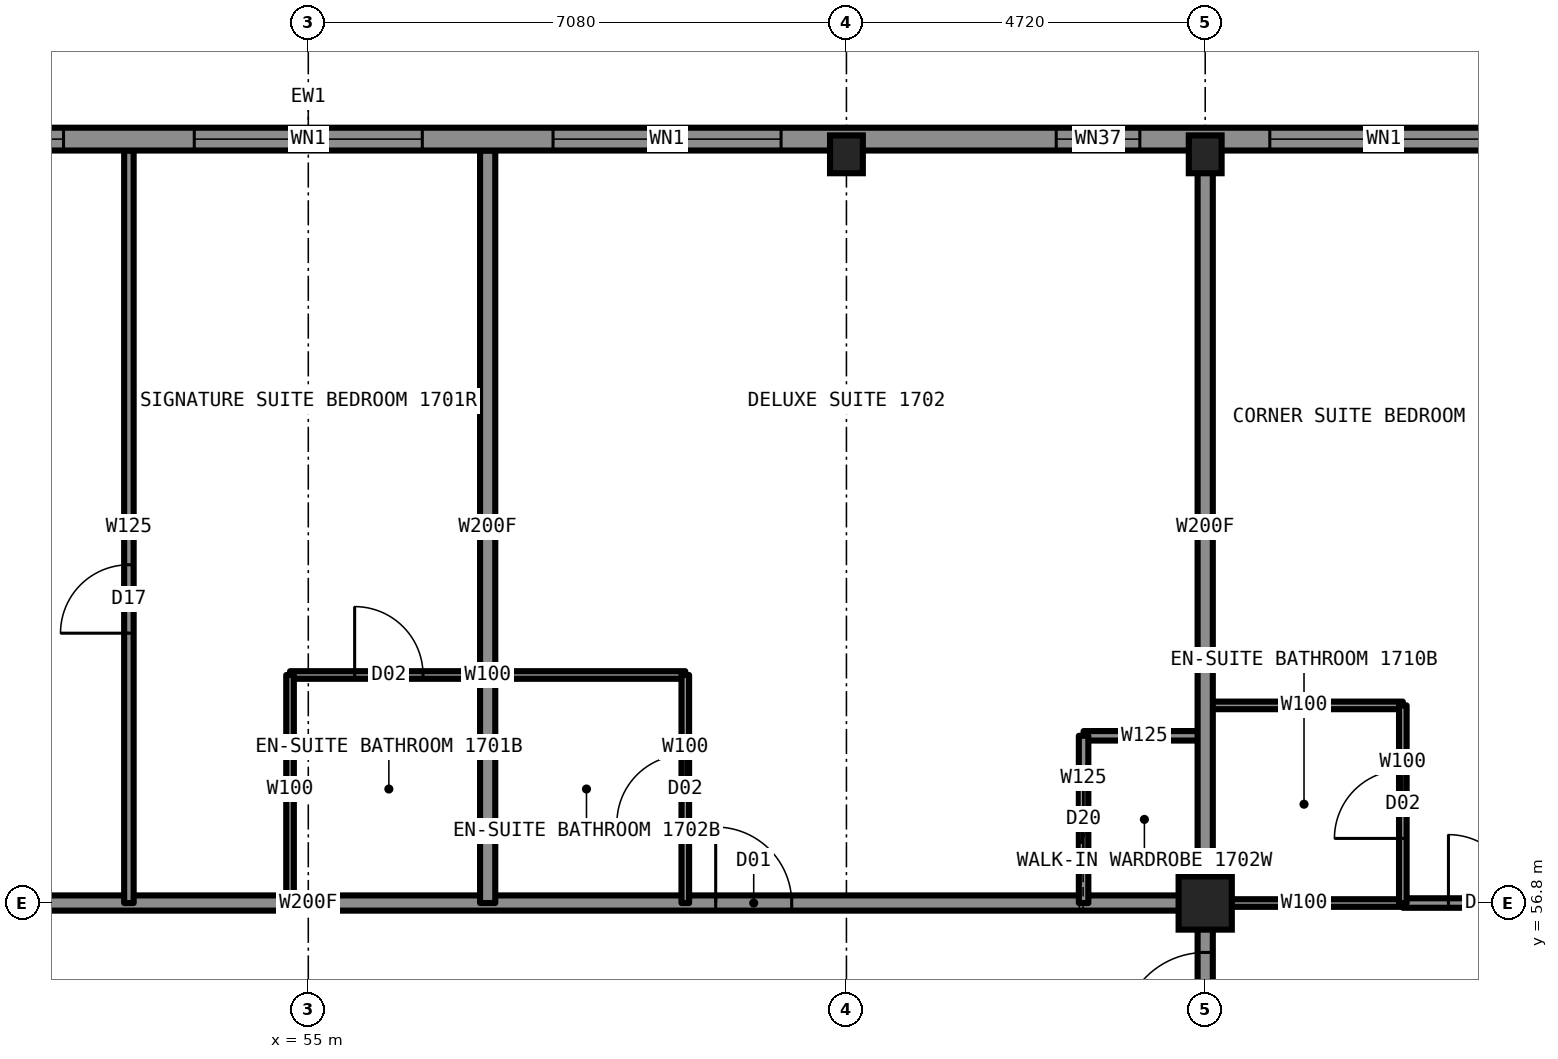
"""IFC4 building model, lengths in metres.
Left out: names, types, materials, properties, quantities, classifications, styles, units other than length and angle.
Written with IfcOpenShell. Run it as: python <this file> out.ifc"""

import sys

from ifc_helpers import new_model, si_unit, direction, frame, frame_2d, origin, origin_2d, place, context, subcontext, project, spatial, rectangle, hollow_rectangle, i_section, extrude, element, fill, save


model = new_model("IFC4")
c1 = context("Model", 3, precision=1e-05, world=origin(), true_north=direction((0.0, 1.0)))
c2 = subcontext(c1, "Body", "Model", "MODEL_VIEW")
j1 = project(units=[si_unit("LENGTHUNIT", "METRE"), si_unit("PLANEANGLEUNIT", "RADIAN")], contexts=[c1])
p1 = place(None, origin())
s1 = spatial("IfcSite", under=j1, at=p1, CompositionType="ELEMENT")
p2 = place(p1, origin())
s2 = spatial("IfcBuilding", under=s1, at=p2, CompositionType="ELEMENT")
p3 = place(p2, frame((0.0, 0.0, 60.0)))
s3 = spatial("IfcBuildingStorey", under=s2, at=p3, CompositionType="ELEMENT", Elevation=60.0)
for number, where, z_axis, x_axis in (
    (1, (62.08, 66.65, 0.0), (0.0, 0.0, 1.0), (1.0, 0.0, 0.0)),
    (2, (66.8, 66.65, 0.0), (0.0, 0.0, 1.0), (1.0, 0.0, 0.0)),
):
    element("IfcColumn", number, at=place(p3, frame(where, z_axis=z_axis, x_axis=x_axis)), inside=s3, PredefinedType="COLUMN", context=c2, shape_type="SweptSolid", body=[
        extrude(i_section(OverallWidth=0.432, OverallDepth=0.498, WebThickness=0.056, FlangeThickness=0.089, at=origin_2d()), origin(), (0.0, 0.0, 1.0), 3.5),
    ])
p4 = place(p3, frame((66.8, 56.8, 0.0), z_axis=(0.0, 0.0, 1.0), x_axis=(1.0, 0.0, 0.0)))
e3 = element("IfcColumn", 3, at=p4, inside=s3, PredefinedType="COLUMN", context=c2, shape_type="SweptSolid", body=[
    extrude(hollow_rectangle(XDim=0.7, YDim=0.7, WallThickness=0.06, at=origin_2d()), origin(), (0.0, 0.0, 1.0), 3.5),
])
p5 = place(p3, frame((66.8, 56.8, 0.0), z_axis=(0.0, 0.0, 1.0), x_axis=(1.0, 0.0, 0.0)))
e4 = element("IfcWall", 4, at=p5, inside=s3, PredefinedType="PARTITIONING", context=c2, shape_type="SweptSolid", body=[
    extrude(rectangle(XDim=2.6, YDim=0.1, at=frame_2d((1.3, 0.0))), origin(), (0.0, 0.0, 1.0), 2.573),
])
p6 = place(p3, frame((43.2, 56.8, 0.0), z_axis=(0.0, 0.0, 1.0), x_axis=(1.0, 0.0, 0.0)))
e5 = element("IfcWall", 5, at=p6, inside=s3, PredefinedType="PARTITIONING", context=c2, shape_type="SweptSolid", body=[
    extrude(rectangle(XDim=23.6, YDim=0.2, at=frame_2d((11.8, 0.0))), origin(), (0.0, 0.0, 1.0), 3.33),
])
p7 = place(p6, frame((1.85, 0.0, 0.0)))
e6 = element("IfcOpeningElement", 6, at=p7, cuts=e5, PredefinedType="OPENING", context=c2, shape_type="SweptSolid", body=[
    extrude(rectangle(XDim=1.1, YDim=2.2, at=frame_2d((0.55, 1.1))), frame((0.0, 0.11, 0.0), z_axis=(0.0, -1.0, 0.0), x_axis=(1.0, 0.0, 0.0)), (0.0, 0.0, 1.0), 0.22),
])
p8 = place(p6, frame((17.16, 0.0, 0.0)))
e7 = element("IfcOpeningElement", 7, at=p8, cuts=e5, PredefinedType="OPENING", context=c2, shape_type="SweptSolid", body=[
    extrude(rectangle(XDim=1.0, YDim=2.2, at=frame_2d((0.5, 1.1))), frame((0.0, 0.11, 0.0), z_axis=(0.0, -1.0, 0.0), x_axis=(1.0, 0.0, 0.0)), (0.0, 0.0, 1.0), 0.22),
])
p9 = place(p3, frame((69.4, 56.8, 0.0), z_axis=(0.0, 0.0, 1.0), x_axis=(1.0, 0.0, 0.0)))
e8 = element("IfcWall", 8, at=p9, inside=s3, PredefinedType="PARTITIONING", context=c2, shape_type="SweptSolid", body=[
    extrude(rectangle(XDim=7.3, YDim=0.125, at=frame_2d((3.65, 0.0))), origin(), (0.0, 0.0, 1.0), 2.573),
])
p10 = place(p9, frame((0.6, 0.0, 0.0)))
e9 = element("IfcOpeningElement", 9, at=p10, cuts=e8, PredefinedType="OPENING", context=c2, shape_type="SweptSolid", body=[
    extrude(rectangle(XDim=0.9, YDim=2.2, at=frame_2d((0.45, 1.1))), frame((0.0, 0.073, 0.0), z_axis=(0.0, -1.0, 0.0), x_axis=(1.0, 0.0, 0.0)), (0.0, 0.0, 1.0), 0.145),
])
p11 = place(p9, frame((4.4, 0.0, 0.0)))
e10 = element("IfcOpeningElement", 10, at=p11, cuts=e8, PredefinedType="OPENING", context=c2, shape_type="SweptSolid", body=[
    extrude(rectangle(XDim=0.9, YDim=2.2, at=frame_2d((0.45, 1.1))), frame((0.0, 0.073, 0.0), z_axis=(0.0, -1.0, 0.0), x_axis=(1.0, 0.0, 0.0)), (0.0, 0.0, 1.0), 0.145),
])
p12 = place(p3, frame((65.2, 59.0, 0.0), z_axis=(0.0, 0.0, 1.0), x_axis=(1.0, 0.0, 0.0)))
e11 = element("IfcWall", 11, at=p12, inside=s3, PredefinedType="PARTITIONING", context=c2, shape_type="SweptSolid", body=[
    extrude(rectangle(XDim=1.6, YDim=0.125, at=frame_2d((0.8, 0.0))), origin(), (0.0, 0.0, 1.0), 3.33),
])
p13 = place(p3, frame((66.8, 59.4, 0.0), z_axis=(0.0, 0.0, 1.0), x_axis=(1.0, 0.0, 0.0)))
e12 = element("IfcWall", 12, at=p13, inside=s3, PredefinedType="PARTITIONING", context=c2, shape_type="SweptSolid", body=[
    extrude(rectangle(XDim=2.6, YDim=0.1, at=frame_2d((1.3, 0.0))), origin(), (0.0, 0.0, 1.0), 3.33),
])
p14 = place(p3, frame((54.76, 59.8, 0.0), z_axis=(0.0, 0.0, 1.0), x_axis=(1.0, 0.0, 0.0)))
e13 = element("IfcWall", 13, at=p14, inside=s3, PredefinedType="PARTITIONING", context=c2, shape_type="SweptSolid", body=[
    extrude(rectangle(XDim=5.2, YDim=0.1, at=frame_2d((2.6, 0.0))), origin(), (0.0, 0.0, 1.0), 3.33),
])
p15 = place(p14, frame((0.85, 0.0, 0.0)))
e14 = element("IfcOpeningElement", 14, at=p15, cuts=e13, PredefinedType="OPENING", context=c2, shape_type="SweptSolid", body=[
    extrude(rectangle(XDim=0.9, YDim=2.1, at=frame_2d((0.45, 1.05))), frame((0.0, 0.06, 0.0), z_axis=(0.0, -1.0, 0.0), x_axis=(1.0, 0.0, 0.0)), (0.0, 0.0, 1.0), 0.12),
])
p16 = place(p3, frame((54.76, 56.8, 0.0), z_axis=(0.0, 0.0, 1.0), x_axis=(0.0, 1.0, 0.0)))
e15 = element("IfcWall", 15, at=p16, inside=s3, PredefinedType="PARTITIONING", context=c2, shape_type="SweptSolid", body=[
    extrude(rectangle(XDim=3.0, YDim=0.1, at=frame_2d((1.5, 0.0))), origin(), (0.0, 0.0, 1.0), 3.33),
])
p17 = place(p3, frame((52.64, 56.8, 0.0), z_axis=(0.0, 0.0, 1.0), x_axis=(0.0, 1.0, 0.0)))
e16 = element("IfcWall", 16, at=p17, inside=s3, PredefinedType="PARTITIONING", context=c2, shape_type="SweptSolid", body=[
    extrude(rectangle(XDim=9.9, YDim=0.125, at=frame_2d((4.95, 0.0))), origin(), (0.0, 0.0, 1.0), 3.33),
])
p18 = place(p17, frame((3.55, 0.0, 0.0)))
e17 = element("IfcOpeningElement", 17, at=p18, cuts=e16, PredefinedType="OPENING", context=c2, shape_type="SweptSolid", body=[
    extrude(rectangle(XDim=0.9, YDim=2.2, at=frame_2d((0.45, 1.1))), frame((0.0, 0.073, 0.0), z_axis=(0.0, -1.0, 0.0), x_axis=(1.0, 0.0, 0.0)), (0.0, 0.0, 1.0), 0.145),
])
p19 = place(p3, frame((65.2, 56.8, 0.0), z_axis=(0.0, 0.0, 1.0), x_axis=(0.0, 1.0, 0.0)))
e18 = element("IfcWall", 18, at=p19, inside=s3, PredefinedType="PARTITIONING", context=c2, shape_type="SweptSolid", body=[
    extrude(rectangle(XDim=2.2, YDim=0.125, at=frame_2d((1.1, 0.0))), origin(), (0.0, 0.0, 1.0), 3.33),
])
p20 = place(p19, frame((0.7, 0.0, 0.0)))
e19 = element("IfcOpeningElement", 19, at=p20, cuts=e18, PredefinedType="OPENING", context=c2, shape_type="SweptSolid", body=[
    extrude(rectangle(XDim=0.8, YDim=2.1, at=frame_2d((0.4, 1.05))), frame((0.0, 0.073, 0.0), z_axis=(0.0, -1.0, 0.0), x_axis=(1.0, 0.0, 0.0)), (0.0, 0.0, 1.0), 0.145),
])
p21 = place(p3, frame((66.8, 33.22, 0.0), z_axis=(0.0, 0.0, 1.0), x_axis=(0.0, 1.0, 0.0)))
e20 = element("IfcWall", 20, at=p21, inside=s3, PredefinedType="PARTITIONING", context=c2, shape_type="SweptSolid", body=[
    extrude(rectangle(XDim=23.58, YDim=0.2, at=frame_2d((11.79, 0.0))), origin(), (0.0, 0.0, 1.0), 3.33),
])
p22 = place(p21, frame((7.7, 0.0, 0.0)))
e21 = element("IfcOpeningElement", 21, at=p22, cuts=e20, PredefinedType="OPENING", context=c2, shape_type="SweptSolid", body=[
    extrude(rectangle(XDim=1.0, YDim=2.2, at=frame_2d((0.5, 1.1))), frame((0.0, 0.11, 0.0), z_axis=(0.0, -1.0, 0.0), x_axis=(1.0, 0.0, 0.0)), (0.0, 0.0, 1.0), 0.22),
])
p23 = place(p21, frame((17.29, 0.0, 0.0)))
e22 = element("IfcOpeningElement", 22, at=p23, cuts=e20, PredefinedType="OPENING", context=c2, shape_type="SweptSolid", body=[
    extrude(rectangle(XDim=1.0, YDim=2.2, at=frame_2d((0.5, 1.1))), frame((0.0, 0.11, 0.0), z_axis=(0.0, -1.0, 0.0), x_axis=(1.0, 0.0, 0.0)), (0.0, 0.0, 1.0), 0.22),
])
p24 = place(p21, frame((21.83, 0.0, 0.0)))
e23 = element("IfcOpeningElement", 23, at=p24, cuts=e20, PredefinedType="OPENING", context=c2, shape_type="SweptSolid", body=[
    extrude(rectangle(XDim=1.1, YDim=2.2, at=frame_2d((0.55, 1.1))), frame((0.0, 0.11, 0.0), z_axis=(0.0, -1.0, 0.0), x_axis=(1.0, 0.0, 0.0)), (0.0, 0.0, 1.0), 0.22),
])
p25 = place(p21, frame((0.63, 0.0, 0.0)))
e24 = element("IfcOpeningElement", 24, at=p25, cuts=e20, PredefinedType="OPENING", context=c2, shape_type="SweptSolid", body=[
    extrude(rectangle(XDim=1.1, YDim=2.2, at=frame_2d((0.55, 1.1))), frame((0.0, 0.11, 0.0), z_axis=(0.0, -1.0, 0.0), x_axis=(1.0, 0.0, 0.0)), (0.0, 0.0, 1.0), 0.22),
])
p26 = place(p3, frame((66.8, 56.8, 0.0), z_axis=(0.0, 0.0, 1.0), x_axis=(0.0, 1.0, 0.0)))
e25 = element("IfcWall", 25, at=p26, inside=s3, PredefinedType="PARTITIONING", context=c2, shape_type="SweptSolid", body=[
    extrude(rectangle(XDim=9.9, YDim=0.2, at=frame_2d((4.95, 0.0))), origin(), (0.0, 0.0, 1.0), 2.573),
])
p27 = place(p3, frame((69.4, 56.8, 0.0), z_axis=(0.0, 0.0, 1.0), x_axis=(0.0, 1.0, 0.0)))
e26 = element("IfcWall", 26, at=p27, inside=s3, PredefinedType="PARTITIONING", context=c2, shape_type="SweptSolid", body=[
    extrude(rectangle(XDim=2.6, YDim=0.1, at=frame_2d((1.3, 0.0))), origin(), (0.0, 0.0, 1.0), 3.33),
])
p28 = place(p27, frame((0.85, 0.0, 0.0)))
e27 = element("IfcOpeningElement", 27, at=p28, cuts=e26, PredefinedType="OPENING", context=c2, shape_type="SweptSolid", body=[
    extrude(rectangle(XDim=0.9, YDim=2.1, at=frame_2d((0.45, 1.05))), frame((0.0, 0.06, 0.0), z_axis=(0.0, -1.0, 0.0), x_axis=(1.0, 0.0, 0.0)), (0.0, 0.0, 1.0), 0.12),
])
p29 = place(p3, frame((57.36, 56.8, 0.0), z_axis=(0.0, 0.0, 1.0), x_axis=(0.0, 1.0, 0.0)))
e28 = element("IfcWall", 28, at=p29, inside=s3, PredefinedType="PARTITIONING", context=c2, shape_type="SweptSolid", body=[
    extrude(rectangle(XDim=9.9, YDim=0.2, at=frame_2d((4.95, 0.0))), origin(), (0.0, 0.0, 1.0), 3.33),
])
p30 = place(p3, frame((59.96, 56.8, 0.0), z_axis=(0.0, 0.0, 1.0), x_axis=(0.0, 1.0, 0.0)))
e29 = element("IfcWall", 29, at=p30, inside=s3, PredefinedType="PARTITIONING", context=c2, shape_type="SweptSolid", body=[
    extrude(rectangle(XDim=3.0, YDim=0.1, at=frame_2d((1.5, 0.0))), origin(), (0.0, 0.0, 1.0), 3.33),
])
p31 = place(p30, frame((1.05, 0.0, 0.0)))
e30 = element("IfcOpeningElement", 30, at=p31, cuts=e29, PredefinedType="OPENING", context=c2, shape_type="SweptSolid", body=[
    extrude(rectangle(XDim=0.9, YDim=2.1, at=frame_2d((0.45, 1.05))), frame((0.0, 0.06, 0.0), z_axis=(0.0, -1.0, 0.0), x_axis=(1.0, 0.0, 0.0)), (0.0, 0.0, 1.0), 0.12),
])
p32 = place(p3, frame((71.5, 66.85, 0.0), z_axis=(0.0, 0.0, 1.0), x_axis=(-1.0, 0.0, 0.0)))
e31 = element("IfcWall", 31, at=p32, inside=s3, PredefinedType="SOLIDWALL", context=c2, shape_type="SweptSolid", body=[
    extrude(rectangle(XDim=33.0, YDim=0.3, at=frame_2d((16.5, 0.0))), origin(), (0.0, 0.0, 1.0), 2.83),
])
p33 = place(p32, frame((0.85, 0.0, 0.5)))
e32 = element("IfcOpeningElement", 32, at=p33, cuts=e31, PredefinedType="OPENING", context=c2, shape_type="SweptSolid", body=[
    extrude(rectangle(XDim=3.0, YDim=2.0, at=frame_2d((1.5, 1.0))), frame((0.0, 0.16, 0.0), z_axis=(0.0, -1.0, 0.0), x_axis=(1.0, 0.0, 0.0)), (0.0, 0.0, 1.0), 0.32),
])
p34 = place(p32, frame((5.56, 0.0, 0.5)))
e33 = element("IfcOpeningElement", 33, at=p34, cuts=e31, PredefinedType="OPENING", context=c2, shape_type="SweptSolid", body=[
    extrude(rectangle(XDim=3.0, YDim=2.0, at=frame_2d((1.5, 1.0))), frame((0.0, 0.16, 0.0), z_axis=(0.0, -1.0, 0.0), x_axis=(1.0, 0.0, 0.0)), (0.0, 0.0, 1.0), 0.32),
])
p35 = place(p32, frame((10.28, 0.0, 0.5)))
e34 = element("IfcOpeningElement", 34, at=p35, cuts=e31, PredefinedType="OPENING", context=c2, shape_type="SweptSolid", body=[
    extrude(rectangle(XDim=1.2, YDim=1.7, at=frame_2d((0.6, 0.85))), frame((0.0, 0.16, 0.0), z_axis=(0.0, -1.0, 0.0), x_axis=(1.0, 0.0, 0.0)), (0.0, 0.0, 1.0), 0.32),
])
p36 = place(p32, frame((15.0, 0.0, 0.5)))
e35 = element("IfcOpeningElement", 35, at=p36, cuts=e31, PredefinedType="OPENING", context=c2, shape_type="SweptSolid", body=[
    extrude(rectangle(XDim=3.0, YDim=2.0, at=frame_2d((1.5, 1.0))), frame((0.0, 0.16, 0.0), z_axis=(0.0, -1.0, 0.0), x_axis=(1.0, 0.0, 0.0)), (0.0, 0.0, 1.0), 0.32),
])
p37 = place(p32, frame((21.52, 0.0, 0.5)))
e36 = element("IfcOpeningElement", 36, at=p37, cuts=e31, PredefinedType="OPENING", context=c2, shape_type="SweptSolid", body=[
    extrude(rectangle(XDim=1.2, YDim=1.7, at=frame_2d((0.6, 0.85))), frame((0.0, 0.16, 0.0), z_axis=(0.0, -1.0, 0.0), x_axis=(1.0, 0.0, 0.0)), (0.0, 0.0, 1.0), 0.32),
])
p38 = place(p32, frame((24.44, 0.0, 0.5)))
e37 = element("IfcOpeningElement", 37, at=p38, cuts=e31, PredefinedType="OPENING", context=c2, shape_type="SweptSolid", body=[
    extrude(rectangle(XDim=3.0, YDim=2.0, at=frame_2d((1.5, 1.0))), frame((0.0, 0.16, 0.0), z_axis=(0.0, -1.0, 0.0), x_axis=(1.0, 0.0, 0.0)), (0.0, 0.0, 1.0), 0.32),
])
p39 = place(p32, frame((29.15, 0.0, 0.5)))
e38 = element("IfcOpeningElement", 38, at=p39, cuts=e31, PredefinedType="OPENING", context=c2, shape_type="SweptSolid", body=[
    extrude(rectangle(XDim=3.0, YDim=2.0, at=frame_2d((1.5, 1.0))), frame((0.0, 0.16, 0.0), z_axis=(0.0, -1.0, 0.0), x_axis=(1.0, 0.0, 0.0)), (0.0, 0.0, 1.0), 0.32),
])
p40 = place(p32, frame((11.48, 0.0, 0.5)))
e39 = element("IfcOpeningElement", 39, at=p40, cuts=e31, PredefinedType="OPENING", context=c2, shape_type="SweptSolid", body=[
    extrude(rectangle(XDim=0.6, YDim=0.8, at=frame_2d((0.3, 0.4))), frame((0.0, 0.16, 0.0), z_axis=(0.0, -1.0, 0.0), x_axis=(1.0, 0.0, 0.0)), (0.0, 0.0, 1.0), 0.32),
])
p41 = place(p32, frame((20.87, 0.0, 0.5)))
e40 = element("IfcOpeningElement", 40, at=p41, cuts=e31, PredefinedType="OPENING", context=c2, shape_type="SweptSolid", body=[
    extrude(rectangle(XDim=0.6, YDim=0.8, at=frame_2d((0.3, 0.4))), frame((0.0, 0.16, 0.0), z_axis=(0.0, -1.0, 0.0), x_axis=(1.0, 0.0, 0.0)), (0.0, 0.0, 1.0), 0.32),
])
p42 = place(p15, origin())
e41 = element("IfcDoor", 41, at=p42, inside=s3, OperationType="SINGLE_SWING_RIGHT", PredefinedType="DOOR", context=c2, shape_type="SweptSolid", body=[
    extrude(rectangle(XDim=0.9, YDim=2.1, at=frame_2d((0.45, 1.05))), frame((0.0, 0.025, 0.0), z_axis=(0.0, -1.0, 0.0), x_axis=(1.0, 0.0, 0.0)), (0.0, 0.0, 1.0), 0.05),
])
fill(e14, e41)
p43 = place(p18, origin())
e42 = element("IfcDoor", 42, at=p43, inside=s3, OperationType="SINGLE_SWING_LEFT", PredefinedType="DOOR", context=c2, shape_type="SweptSolid", body=[
    extrude(rectangle(XDim=0.9, YDim=2.2, at=frame_2d((0.45, 1.1))), frame((0.0, 0.025, 0.0), z_axis=(0.0, -1.0, 0.0), x_axis=(1.0, 0.0, 0.0)), (0.0, 0.0, 1.0), 0.05),
])
fill(e17, e42)
p44 = place(p8, origin())
e43 = element("IfcDoor", 43, at=p44, inside=s3, OperationType="SINGLE_SWING_LEFT", PredefinedType="DOOR", context=c2, shape_type="SweptSolid", body=[
    extrude(rectangle(XDim=1.0, YDim=2.2, at=frame_2d((0.5, 1.1))), frame((0.0, 0.025, 0.0), z_axis=(0.0, -1.0, 0.0), x_axis=(1.0, 0.0, 0.0)), (0.0, 0.0, 1.0), 0.05),
])
fill(e7, e43)
p45 = place(p31, origin())
e44 = element("IfcDoor", 44, at=p45, inside=s3, OperationType="SINGLE_SWING_RIGHT", PredefinedType="DOOR", context=c2, shape_type="SweptSolid", body=[
    extrude(rectangle(XDim=0.9, YDim=2.1, at=frame_2d((0.45, 1.05))), frame((0.0, 0.025, 0.0), z_axis=(0.0, -1.0, 0.0), x_axis=(1.0, 0.0, 0.0)), (0.0, 0.0, 1.0), 0.05),
])
fill(e30, e44)
p46 = place(p20, origin())
e45 = element("IfcDoor", 45, at=p46, inside=s3, OperationType="SLIDING_TO_LEFT", PredefinedType="DOOR", context=c2, shape_type="SweptSolid", body=[
    extrude(rectangle(XDim=0.8, YDim=2.1, at=frame_2d((0.4, 1.05))), frame((0.0, 0.025, 0.0), z_axis=(0.0, -1.0, 0.0), x_axis=(1.0, 0.0, 0.0)), (0.0, 0.0, 1.0), 0.05),
])
fill(e19, e45)
p47 = place(p24, origin())
e46 = element("IfcDoor", 46, at=p47, inside=s3, OperationType="SINGLE_SWING_LEFT", PredefinedType="DOOR", context=c2, shape_type="SweptSolid", body=[
    extrude(rectangle(XDim=1.1, YDim=2.2, at=frame_2d((0.55, 1.1))), frame((0.0, 0.025, 0.0), z_axis=(0.0, -1.0, 0.0), x_axis=(1.0, 0.0, 0.0)), (0.0, 0.0, 1.0), 0.05),
])
fill(e23, e46)
p48 = place(p28, origin())
e47 = element("IfcDoor", 47, at=p48, inside=s3, OperationType="SINGLE_SWING_RIGHT", PredefinedType="DOOR", context=c2, shape_type="SweptSolid", body=[
    extrude(rectangle(XDim=0.9, YDim=2.1, at=frame_2d((0.45, 1.05))), frame((0.0, 0.025, 0.0), z_axis=(0.0, -1.0, 0.0), x_axis=(1.0, 0.0, 0.0)), (0.0, 0.0, 1.0), 0.05),
])
fill(e27, e47)
p49 = place(p10, origin())
e48 = element("IfcDoor", 48, at=p49, inside=s3, OperationType="SINGLE_SWING_LEFT", PredefinedType="DOOR", context=c2, shape_type="SweptSolid", body=[
    extrude(rectangle(XDim=0.9, YDim=2.2, at=frame_2d((0.45, 1.1))), frame((0.0, 0.025, 0.0), z_axis=(0.0, -1.0, 0.0), x_axis=(1.0, 0.0, 0.0)), (0.0, 0.0, 1.0), 0.05),
])
fill(e9, e48)
p50 = place(p33, origin())
e49 = element("IfcWindow", 49, at=p50, inside=s3, PartitioningType="SINGLE_PANEL", PredefinedType="WINDOW", context=c2, shape_type="SweptSolid", body=[
    extrude(rectangle(XDim=3.0, YDim=2.0, at=frame_2d((1.5, 1.0))), frame((0.0, 0.03, 0.0), z_axis=(0.0, -1.0, 0.0), x_axis=(1.0, 0.0, 0.0)), (0.0, 0.0, 1.0), 0.06),
])
fill(e32, e49)
p51 = place(p34, origin())
e50 = element("IfcWindow", 50, at=p51, inside=s3, PartitioningType="SINGLE_PANEL", PredefinedType="WINDOW", context=c2, shape_type="SweptSolid", body=[
    extrude(rectangle(XDim=3.0, YDim=2.0, at=frame_2d((1.5, 1.0))), frame((0.0, 0.03, 0.0), z_axis=(0.0, -1.0, 0.0), x_axis=(1.0, 0.0, 0.0)), (0.0, 0.0, 1.0), 0.06),
])
fill(e33, e50)
p52 = place(p35, origin())
e51 = element("IfcWindow", 51, at=p52, inside=s3, PartitioningType="SINGLE_PANEL", PredefinedType="WINDOW", context=c2, shape_type="SweptSolid", body=[
    extrude(rectangle(XDim=1.2, YDim=1.7, at=frame_2d((0.6, 0.85))), frame((0.0, 0.03, 0.0), z_axis=(0.0, -1.0, 0.0), x_axis=(1.0, 0.0, 0.0)), (0.0, 0.0, 1.0), 0.06),
])
fill(e34, e51)
p53 = place(p36, origin())
e52 = element("IfcWindow", 52, at=p53, inside=s3, PartitioningType="SINGLE_PANEL", PredefinedType="WINDOW", context=c2, shape_type="SweptSolid", body=[
    extrude(rectangle(XDim=3.0, YDim=2.0, at=frame_2d((1.5, 1.0))), frame((0.0, 0.03, 0.0), z_axis=(0.0, -1.0, 0.0), x_axis=(1.0, 0.0, 0.0)), (0.0, 0.0, 1.0), 0.06),
])
fill(e35, e52)
p54 = place(p40, origin())
e53 = element("IfcWindow", 53, at=p54, inside=s3, PartitioningType="SINGLE_PANEL", PredefinedType="WINDOW", context=c2, shape_type="SweptSolid", body=[
    extrude(rectangle(XDim=0.6, YDim=0.8, at=frame_2d((0.3, 0.4))), frame((0.0, 0.03, 0.0), z_axis=(0.0, -1.0, 0.0), x_axis=(1.0, 0.0, 0.0)), (0.0, 0.0, 1.0), 0.06),
])
fill(e39, e53)
save(model, sys.argv[1])
